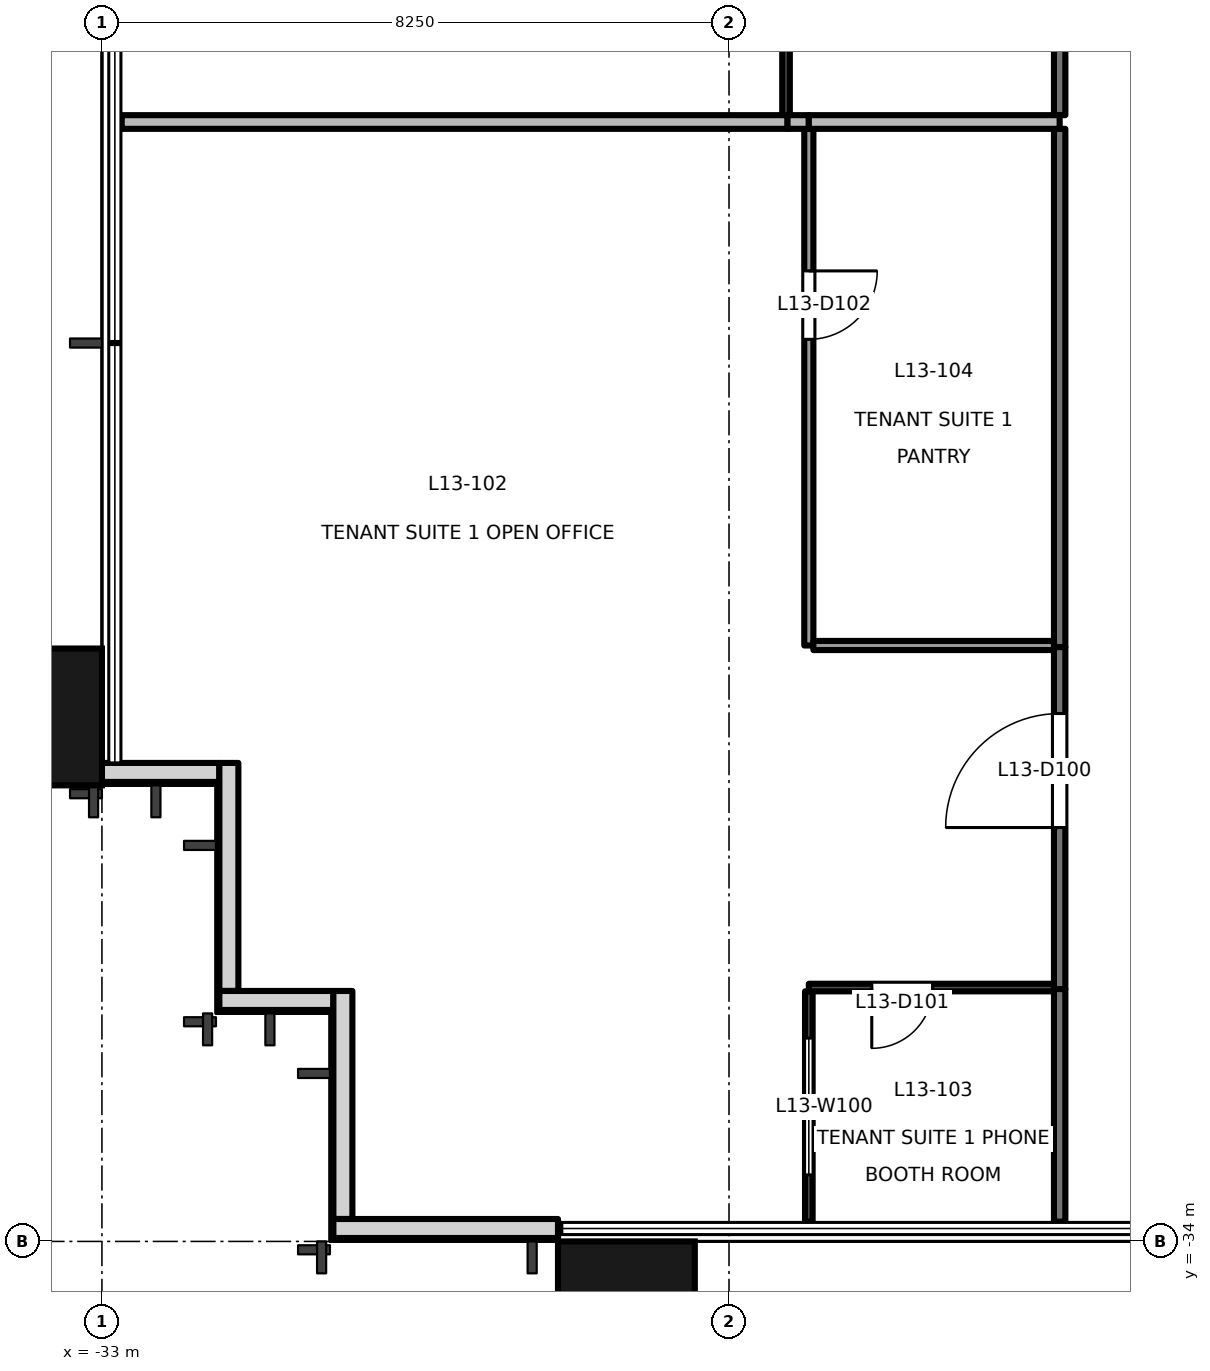
"""IFC4 building model, lengths in metres.
Left out: names, types, materials, properties, quantities, classifications, styles, units other than length and angle.
Written with IfcOpenShell. Run it as: python <this file> out.ifc"""

import sys

from ifc_helpers import new_model, si_unit, direction, frame, frame_2d, origin, origin_2d, place, context, subcontext, project, spatial, rectangle, extrude, element, fill, save


model = new_model("IFC4")
c1 = context("Model", 3, precision=1e-05, world=origin(), true_north=direction((0.0, 1.0)))
c2 = subcontext(c1, "Body", "Model", "MODEL_VIEW")
j1 = project(units=[si_unit("LENGTHUNIT", "METRE"), si_unit("PLANEANGLEUNIT", "RADIAN")], contexts=[c1])
p1 = place(None, origin())
s1 = spatial("IfcSite", under=j1, at=p1, CompositionType="ELEMENT")
p2 = place(p1, origin())
s2 = spatial("IfcBuilding", under=s1, at=p2, CompositionType="ELEMENT")
p3 = place(p2, frame((0.0, 0.0, 61.1)))
s3 = spatial("IfcBuildingStorey", under=s2, at=p3, CompositionType="ELEMENT", Elevation=61.1)
for number, where, z_axis, x_axis in (
    (1, (-26.1, -34.9, -0.2), (0.0, 0.0, 1.0), (1.0, 0.0, 0.0)),
    (2, (-33.9, -27.1, -0.2), (0.0, 0.0, 1.0), (0.0, 1.0, 0.0)),
):
    element("IfcColumn", number, at=place(p3, frame(where, z_axis=z_axis, x_axis=x_axis)), inside=s3, PredefinedType="COLUMN", context=c2, shape_type="SweptSolid", body=[
        extrude(rectangle(XDim=1.8, YDim=1.8, at=origin_2d()), origin(), (0.0, 0.0, 1.0), 4.1),
    ])
p4 = place(p3, frame((-33.005, -27.83, 0.0), z_axis=(0.0, 0.0, 1.0), x_axis=(1.0, 0.0, 0.0)))
e3 = element("IfcWall", 3, at=p4, inside=s3, PredefinedType="SOLIDWALL", context=c2, shape_type="SweptSolid", body=[
    extrude(rectangle(XDim=1.55, YDim=0.25, at=frame_2d((0.775, 0.0))), origin(), (0.0, 0.0, 1.0), 3.9),
])
p5 = place(p3, frame((-31.33, -27.705, 0.0), z_axis=(0.0, 0.0, 1.0), x_axis=(0.0, -1.0, 0.0)))
e4 = element("IfcWall", 4, at=p5, inside=s3, PredefinedType="SOLIDWALL", context=c2, shape_type="SweptSolid", body=[
    extrude(rectangle(XDim=3.0, YDim=0.25, at=frame_2d((1.5, 0.0))), origin(), (0.0, 0.0, 1.0), 3.9),
])
p6 = place(p3, frame((-31.455, -30.83, 0.0), z_axis=(0.0, 0.0, 1.0), x_axis=(1.0, 0.0, 0.0)))
e5 = element("IfcWall", 5, at=p6, inside=s3, PredefinedType="SOLIDWALL", context=c2, shape_type="SweptSolid", body=[
    extrude(rectangle(XDim=1.5, YDim=0.25, at=frame_2d((0.75, 0.0))), origin(), (0.0, 0.0, 1.0), 3.9),
])
p7 = place(p3, frame((-29.83, -30.705, 0.0), z_axis=(0.0, 0.0, 1.0), x_axis=(0.0, -1.0, 0.0)))
e6 = element("IfcWall", 6, at=p7, inside=s3, PredefinedType="SOLIDWALL", context=c2, shape_type="SweptSolid", body=[
    extrude(rectangle(XDim=3.0, YDim=0.25, at=frame_2d((1.5, 0.0))), origin(), (0.0, 0.0, 1.0), 3.9),
])
p8 = place(p3, frame((-29.955, -33.83, 0.0), z_axis=(0.0, 0.0, 1.0), x_axis=(1.0, 0.0, 0.0)))
e7 = element("IfcWall", 7, at=p8, inside=s3, PredefinedType="SOLIDWALL", context=c2, shape_type="SweptSolid", body=[
    extrude(rectangle(XDim=2.955, YDim=0.25, at=frame_2d((1.478, 0.0))), origin(), (0.0, 0.0, 1.0), 3.9),
])
p9 = place(p3, frame((-20.4, -30.68, 0.0), z_axis=(0.0, 0.0, 1.0), x_axis=(0.0, 1.0, 0.0)))
e8 = element("IfcWall", 8, at=p9, inside=s3, PredefinedType="PARTITIONING", context=c2, shape_type="SweptSolid", body=[
    extrude(rectangle(XDim=4.5, YDim=0.15, at=frame_2d((2.25, 0.0))), origin(), (0.0, 0.0, 1.0), 3.3),
])
p10 = place(p9, frame((2.125, 0.0, 0.0)))
e9 = element("IfcOpeningElement", 9, at=p10, cuts=e8, PredefinedType="OPENING", context=c2, shape_type="SweptSolid", body=[
    extrude(rectangle(XDim=1.5, YDim=2.1, at=frame_2d((0.75, 1.05))), frame((0.0, 0.085, 0.0), z_axis=(0.0, -1.0, 0.0), x_axis=(1.0, 0.0, 0.0)), (0.0, 0.0, 1.0), 0.171),
])
p11 = place(p3, frame((-20.4, -33.74, 0.0), z_axis=(0.0, 0.0, 1.0), x_axis=(0.0, 1.0, 0.0)))
e10 = element("IfcWall", 10, at=p11, inside=s3, PredefinedType="PARTITIONING", context=c2, shape_type="SweptSolid", body=[
    extrude(rectangle(XDim=3.06, YDim=0.15, at=frame_2d((1.53, 0.0))), origin(), (0.0, 0.0, 1.0), 3.9),
])
p12 = place(p3, frame((-20.4, -26.18, 0.0), z_axis=(0.0, 0.0, 1.0), x_axis=(0.0, 1.0, 0.0)))
e11 = element("IfcWall", 11, at=p12, inside=s3, PredefinedType="PARTITIONING", context=c2, shape_type="SweptSolid", body=[
    extrude(rectangle(XDim=6.817, YDim=0.15, at=frame_2d((3.408, 0.0))), origin(), (0.0, 0.0, 1.0), 3.3),
])
p13 = place(p3, frame((-20.4, -19.183, 0.0), z_axis=(0.0, 0.0, 1.0), x_axis=(0.0, 1.0, 0.0)))
e12 = element("IfcWall", 12, at=p13, inside=s3, PredefinedType="PARTITIONING", context=c2, shape_type="SweptSolid", body=[
    extrude(rectangle(XDim=5.93, YDim=0.15, at=frame_2d((2.965, 0.0))), origin(), (0.0, 0.0, 1.0), 3.3),
])
p14 = place(p3, frame((-23.7, -30.71, 0.0), z_axis=(0.0, 0.0, 1.0), x_axis=(0.0, -1.0, 0.0)))
e13 = element("IfcWall", 13, at=p14, inside=s3, PredefinedType="PARTITIONING", context=c2, shape_type="SweptSolid", body=[
    extrude(rectangle(XDim=3.03, YDim=0.1, at=frame_2d((1.515, 0.0))), origin(), (0.0, 0.0, 1.0), 3.9),
])
p15 = place(p14, frame((0.615, 0.0, 0.9)))
e14 = element("IfcOpeningElement", 14, at=p15, cuts=e13, PredefinedType="OPENING", context=c2, shape_type="SweptSolid", body=[
    extrude(rectangle(XDim=1.8, YDim=1.2, at=frame_2d((0.9, 0.6))), frame((0.0, 0.061, 0.0), z_axis=(0.0, -1.0, 0.0), x_axis=(1.0, 0.0, 0.0)), (0.0, 0.0, 1.0), 0.121),
])
p16 = place(p3, frame((-20.475, -30.66, 0.0), z_axis=(0.0, 0.0, 1.0), x_axis=(-1.0, 0.0, 0.0)))
e15 = element("IfcWall", 15, at=p16, inside=s3, PredefinedType="PARTITIONING", context=c2, shape_type="SweptSolid", body=[
    extrude(rectangle(XDim=3.225, YDim=0.1, at=frame_2d((1.612, 0.0))), origin(), (0.0, 0.0, 1.0), 3.9),
])
p17 = place(p16, frame((1.597, 0.0, 0.0)))
e16 = element("IfcOpeningElement", 16, at=p17, cuts=e15, PredefinedType="OPENING", context=c2, shape_type="SweptSolid", body=[
    extrude(rectangle(XDim=0.8, YDim=2.1, at=frame_2d((0.4, 1.05))), frame((0.0, 0.061, 0.0), z_axis=(0.0, -1.0, 0.0), x_axis=(1.0, 0.0, 0.0)), (0.0, 0.0, 1.0), 0.121),
])
p18 = place(p3, frame((-23.7, -19.363, 0.0), z_axis=(0.0, 0.0, 1.0), x_axis=(0.0, -1.0, 0.0)))
e17 = element("IfcWall", 17, at=p18, inside=s3, PredefinedType="PARTITIONING", context=c2, shape_type="SweptSolid", body=[
    extrude(rectangle(XDim=6.797, YDim=0.12, at=frame_2d((3.398, 0.0))), origin(), (0.0, 0.0, 1.0), 3.3),
])
p19 = place(p18, frame((1.869, 0.0, 0.0)))
e18 = element("IfcOpeningElement", 18, at=p19, cuts=e17, PredefinedType="OPENING", context=c2, shape_type="SweptSolid", body=[
    extrude(rectangle(XDim=0.9, YDim=2.1, at=frame_2d((0.45, 1.05))), frame((0.0, 0.071, 0.0), z_axis=(0.0, -1.0, 0.0), x_axis=(1.0, 0.0, 0.0)), (0.0, 0.0, 1.0), 0.141),
])
p20 = place(p3, frame((-23.64, -26.16, 0.0), z_axis=(0.0, 0.0, 1.0), x_axis=(1.0, 0.0, 0.0)))
e19 = element("IfcWall", 19, at=p20, inside=s3, PredefinedType="PARTITIONING", context=c2, shape_type="SweptSolid", body=[
    extrude(rectangle(XDim=3.165, YDim=0.12, at=frame_2d((1.583, 0.0))), origin(), (0.0, 0.0, 1.0), 3.9),
])
p21 = place(p3, frame((-32.74, -19.273, 0.0), z_axis=(0.0, 0.0, 1.0), x_axis=(1.0, 0.0, 0.0)))
e20 = element("IfcWall", 20, at=p21, inside=s3, PredefinedType="PARTITIONING", context=c2, shape_type="SweptSolid", body=[
    extrude(rectangle(XDim=8.76, YDim=0.18, at=frame_2d((4.38, 0.0))), origin(), (0.0, 0.0, 1.0), 3.9),
])
p22 = place(p3, frame((-23.98, -19.273, 0.0), z_axis=(0.0, 0.0, 1.0), x_axis=(1.0, 0.0, 0.0)))
e21 = element("IfcWall", 21, at=p22, inside=s3, PredefinedType="PARTITIONING", context=c2, shape_type="SweptSolid", body=[
    extrude(rectangle(XDim=0.28, YDim=0.18, at=frame_2d((0.14, 0.0))), origin(), (0.0, 0.0, 1.0), 3.9),
])
p23 = place(p3, frame((-23.7, -19.273, 0.0), z_axis=(0.0, 0.0, 1.0), x_axis=(1.0, 0.0, 0.0)))
e22 = element("IfcWall", 22, at=p23, inside=s3, PredefinedType="PARTITIONING", context=c2, shape_type="SweptSolid", body=[
    extrude(rectangle(XDim=3.3, YDim=0.18, at=frame_2d((1.65, 0.0))), origin(), (0.0, 0.0, 1.0), 3.9),
])
p24 = place(p3, frame((-24.0, -13.273, 0.0), z_axis=(0.0, 0.0, 1.0), x_axis=(0.0, -1.0, 0.0)))
e23 = element("IfcWall", 23, at=p24, inside=s3, PredefinedType="PARTITIONING", context=c2, shape_type="SweptSolid", body=[
    extrude(rectangle(XDim=5.91, YDim=0.1, at=frame_2d((2.955, 0.0))), origin(), (0.0, 0.0, 1.0), 3.3),
])
p25 = place(p24, frame((1.633, 0.0, 0.0)))
e24 = element("IfcOpeningElement", 24, at=p25, cuts=e23, PredefinedType="OPENING", context=c2, shape_type="SweptSolid", body=[
    extrude(rectangle(XDim=0.8, YDim=2.1, at=frame_2d((0.4, 1.05))), frame((0.0, 0.061, 0.0), z_axis=(0.0, -1.0, 0.0), x_axis=(1.0, 0.0, 0.0)), (0.0, 0.0, 1.0), 0.121),
])
p26 = place(p10, origin())
e25 = element("IfcDoor", 25, at=p26, inside=s3, OperationType="DOUBLE_DOOR_SINGLE_SWING", PredefinedType="DOOR", context=c2, shape_type="SweptSolid", body=[
    extrude(rectangle(XDim=1.5, YDim=2.1, at=frame_2d((0.75, 1.05))), frame((0.0, 0.025, 0.0), z_axis=(0.0, -1.0, 0.0), x_axis=(1.0, 0.0, 0.0)), (0.0, 0.0, 1.0), 0.05),
])
fill(e9, e25)
p27 = place(p17, origin())
e26 = element("IfcDoor", 26, at=p27, inside=s3, OperationType="SINGLE_SWING_RIGHT", PredefinedType="DOOR", context=c2, shape_type="SweptSolid", body=[
    extrude(rectangle(XDim=0.8, YDim=2.1, at=frame_2d((0.4, 1.05))), frame((0.0, 0.025, 0.0), z_axis=(0.0, -1.0, 0.0), x_axis=(1.0, 0.0, 0.0)), (0.0, 0.0, 1.0), 0.05),
])
fill(e16, e26)
p28 = place(p19, origin())
e27 = element("IfcDoor", 27, at=p28, inside=s3, OperationType="SINGLE_SWING_LEFT", PredefinedType="DOOR", context=c2, shape_type="SweptSolid", body=[
    extrude(rectangle(XDim=0.9, YDim=2.1, at=frame_2d((0.45, 1.05))), frame((0.0, 0.025, 0.0), z_axis=(0.0, -1.0, 0.0), x_axis=(1.0, 0.0, 0.0)), (0.0, 0.0, 1.0), 0.05),
])
fill(e18, e27)
p29 = place(p15, origin())
e28 = element("IfcWindow", 28, at=p29, inside=s3, PartitioningType="SINGLE_PANEL", PredefinedType="WINDOW", context=c2, shape_type="SweptSolid", body=[
    extrude(rectangle(XDim=1.8, YDim=1.2, at=frame_2d((0.9, 0.6))), frame((0.0, 0.03, 0.0), z_axis=(0.0, -1.0, 0.0), x_axis=(1.0, 0.0, 0.0)), (0.0, 0.0, 1.0), 0.06),
])
fill(e14, e28)
save(model, sys.argv[1])
